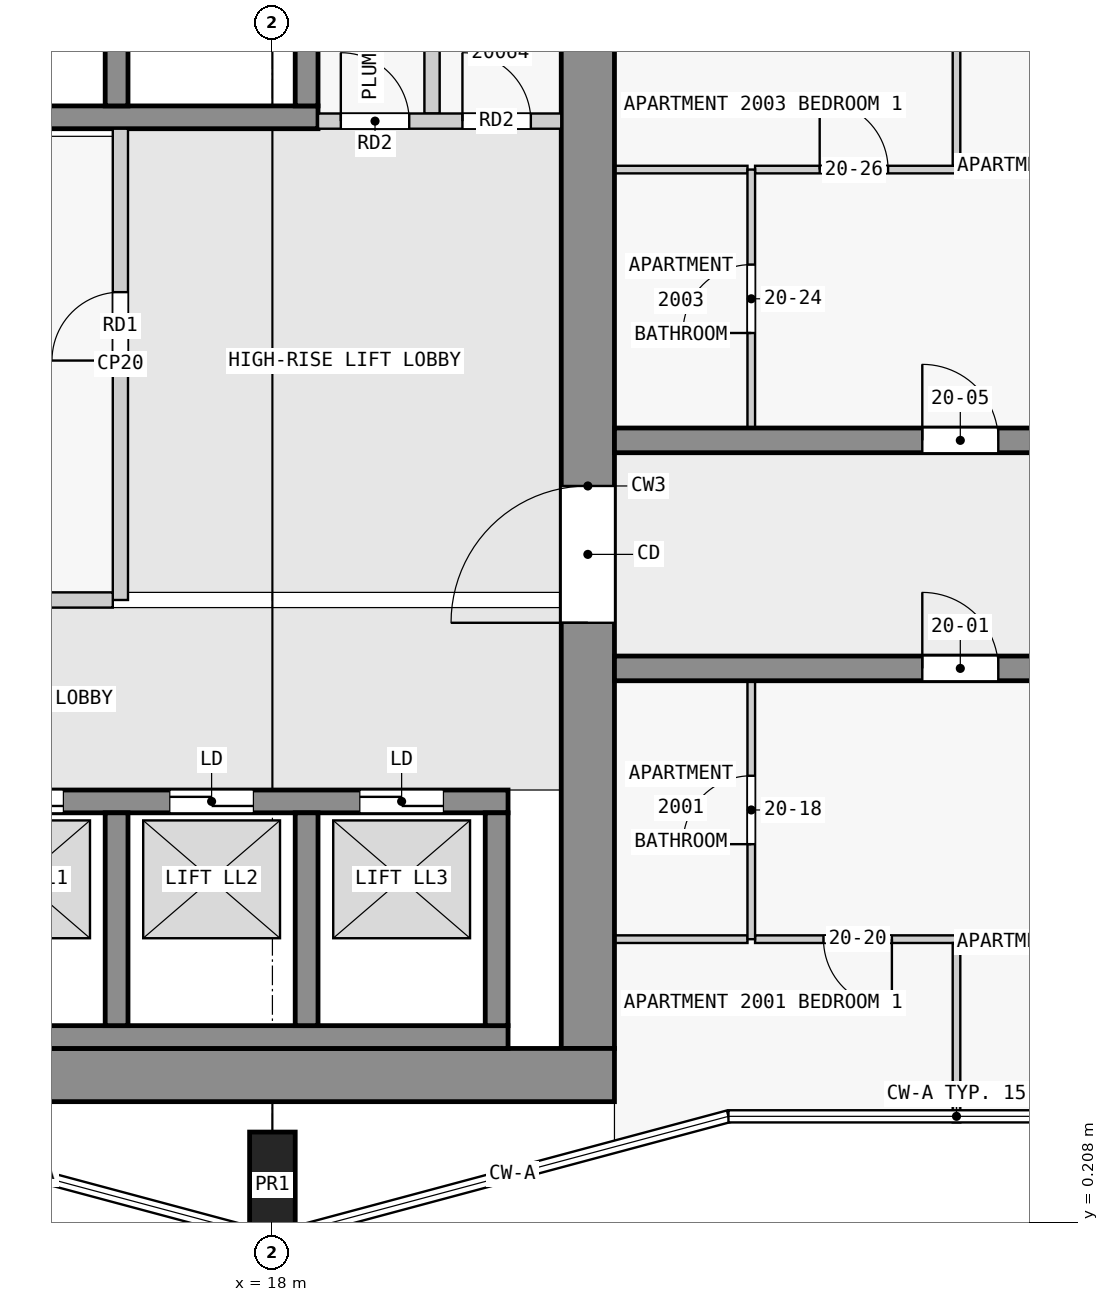
"""IFC4 building model, lengths in metres.
Left out: names, types, materials, properties, quantities, classifications, styles, units other than length and angle.
Written with IfcOpenShell. Run it as: python <this file> out.ifc"""

import sys

from ifc_helpers import new_model, si_unit, direction, frame, frame_2d, origin, origin_2d, place, context, subcontext, project, spatial, rectangle, extrude, element, fill, save


model = new_model("IFC4")
c1 = context("Model", 3, precision=1e-05, world=origin(), true_north=direction((0.0, 1.0)))
c2 = subcontext(c1, "Body", "Model", "MODEL_VIEW")
j1 = project(units=[si_unit("LENGTHUNIT", "METRE"), si_unit("PLANEANGLEUNIT", "RADIAN")], contexts=[c1])
p1 = place(None, origin())
s1 = spatial("IfcSite", under=j1, at=p1, CompositionType="ELEMENT")
p2 = place(p1, origin())
s2 = spatial("IfcBuilding", under=s1, at=p2, CompositionType="ELEMENT")
p3 = place(p2, frame((0.0, 0.0, 81.8)))
s3 = spatial("IfcBuildingStorey", under=s2, at=p3, CompositionType="ELEMENT", Elevation=81.8)
p4 = place(p3, frame((18.0, 0.7, 0.0), z_axis=(0.0, 0.0, 1.0), x_axis=(1.0, 0.0, 0.0)))
e1 = element("IfcColumn", 1, at=p4, inside=s3, PredefinedType="COLUMN", context=c2, shape_type="SweptSolid", body=[
    extrude(rectangle(XDim=0.6, YDim=1.4, at=origin_2d()), origin(), (0.0, 0.0, 1.0), 3.5),
])
p5 = place(p3, frame((1.6, 2.15, 0.0), z_axis=(0.0, 0.0, 1.0), x_axis=(1.0, 0.0, 0.0)))
e2 = element("IfcWall", 2, at=p5, inside=s3, PredefinedType="SHEAR", context=c2, shape_type="SweptSolid", body=[
    extrude(rectangle(XDim=20.9, YDim=0.7, at=frame_2d((10.45, 0.0))), origin(), (0.0, 0.0, 1.0), 3.25),
])
p6 = place(p3, frame((22.15, 2.5, 0.0), z_axis=(0.0, 0.0, 1.0), x_axis=(0.0, 1.0, 0.0)))
e3 = element("IfcWall", 3, at=p6, inside=s3, PredefinedType="SHEAR", context=c2, shape_type="SweptSolid", body=[
    extrude(rectangle(XDim=14.8, YDim=0.7, at=frame_2d((7.4, 0.0))), origin(), (0.0, 0.0, 1.0), 3.25),
])
p7 = place(p6, frame((5.6, 0.0, 0.0)))
e4 = element("IfcOpeningElement", 4, at=p7, cuts=e3, PredefinedType="OPENING", context=c2, shape_type="SweptSolid", body=[
    extrude(rectangle(XDim=1.8, YDim=2.1, at=frame_2d((0.9, 1.05))), frame((0.0, 0.36, 0.0), z_axis=(0.0, -1.0, 0.0), x_axis=(1.0, 0.0, 0.0)), (0.0, 0.0, 1.0), 0.72),
])
p8 = place(p3, frame((13.3, 2.65, 0.0), z_axis=(0.0, 0.0, 1.0), x_axis=(1.0, 0.0, 0.0)))
e5 = element("IfcWall", 5, at=p8, inside=s3, PredefinedType="SHEAR", context=c2, shape_type="SweptSolid", body=[
    extrude(rectangle(XDim=7.8, YDim=0.3, at=frame_2d((3.9, 0.0))), origin(), (0.0, 0.0, 1.0), 3.25),
])
for number, where, z_axis, x_axis in (
    (6, (15.95, 2.8, 0.0), (0.0, 0.0, 1.0), (0.0, 1.0, 0.0)),
    (7, (18.45, 2.8, 0.0), (0.0, 0.0, 1.0), (0.0, 1.0, 0.0)),
    (8, (20.95, 2.8, 0.0), (0.0, 0.0, 1.0), (0.0, 1.0, 0.0)),
):
    element("IfcWall", number, at=place(p3, frame(where, z_axis=z_axis, x_axis=x_axis)), inside=s3, PredefinedType="SHEAR", context=c2, shape_type="SweptSolid", body=[
        extrude(rectangle(XDim=2.8, YDim=0.3, at=frame_2d((1.4, 0.0))), origin(), (0.0, 0.0, 1.0), 3.25),
    ])
p9 = place(p3, frame((2.3, 5.75, 0.0), z_axis=(0.0, 0.0, 1.0), x_axis=(1.0, 0.0, 0.0)))
e9 = element("IfcWall", 9, at=p9, inside=s3, PredefinedType="SHEAR", context=c2, shape_type="SweptSolid", body=[
    extrude(rectangle(XDim=18.8, YDim=0.3, at=frame_2d((9.4, 0.0))), origin(), (0.0, 0.0, 1.0), 3.25),
])
p10 = place(p9, frame((4.65, 0.0, 0.0)))
e10 = element("IfcOpeningElement", 10, at=p10, cuts=e9, PredefinedType="OPENING", context=c2, shape_type="SweptSolid", body=[
    extrude(rectangle(XDim=1.1, YDim=2.1, at=frame_2d((0.55, 1.05))), frame((0.0, 0.16, 0.0), z_axis=(0.0, -1.0, 0.0), x_axis=(1.0, 0.0, 0.0)), (0.0, 0.0, 1.0), 0.32),
])
p11 = place(p9, frame((0.45, 0.0, 0.0)))
e11 = element("IfcOpeningElement", 11, at=p11, cuts=e9, PredefinedType="OPENING", context=c2, shape_type="SweptSolid", body=[
    extrude(rectangle(XDim=1.1, YDim=2.1, at=frame_2d((0.55, 1.05))), frame((0.0, 0.16, 0.0), z_axis=(0.0, -1.0, 0.0), x_axis=(1.0, 0.0, 0.0)), (0.0, 0.0, 1.0), 0.32),
])
p12 = place(p9, frame((2.75, 0.0, 0.0)))
e12 = element("IfcOpeningElement", 12, at=p12, cuts=e9, PredefinedType="OPENING", context=c2, shape_type="SweptSolid", body=[
    extrude(rectangle(XDim=1.1, YDim=2.1, at=frame_2d((0.55, 1.05))), frame((0.0, 0.16, 0.0), z_axis=(0.0, -1.0, 0.0), x_axis=(1.0, 0.0, 0.0)), (0.0, 0.0, 1.0), 0.32),
])
p13 = place(p9, frame((11.85, 0.0, 0.0)))
e13 = element("IfcOpeningElement", 13, at=p13, cuts=e9, PredefinedType="OPENING", context=c2, shape_type="SweptSolid", body=[
    extrude(rectangle(XDim=1.1, YDim=2.1, at=frame_2d((0.55, 1.05))), frame((0.0, 0.16, 0.0), z_axis=(0.0, -1.0, 0.0), x_axis=(1.0, 0.0, 0.0)), (0.0, 0.0, 1.0), 0.32),
])
p14 = place(p9, frame((14.35, 0.0, 0.0)))
e14 = element("IfcOpeningElement", 14, at=p14, cuts=e9, PredefinedType="OPENING", context=c2, shape_type="SweptSolid", body=[
    extrude(rectangle(XDim=1.1, YDim=2.1, at=frame_2d((0.55, 1.05))), frame((0.0, 0.16, 0.0), z_axis=(0.0, -1.0, 0.0), x_axis=(1.0, 0.0, 0.0)), (0.0, 0.0, 1.0), 0.32),
])
p15 = place(p9, frame((16.85, 0.0, 0.0)))
e15 = element("IfcOpeningElement", 15, at=p15, cuts=e9, PredefinedType="OPENING", context=c2, shape_type="SweptSolid", body=[
    extrude(rectangle(XDim=1.1, YDim=2.1, at=frame_2d((0.55, 1.05))), frame((0.0, 0.16, 0.0), z_axis=(0.0, -1.0, 0.0), x_axis=(1.0, 0.0, 0.0)), (0.0, 0.0, 1.0), 0.32),
])
p16 = place(p3, frame((10.8, 14.75, 0.0), z_axis=(0.0, 0.0, 1.0), x_axis=(1.0, 0.0, 0.0)))
e16 = element("IfcWall", 16, at=p16, inside=s3, PredefinedType="SHEAR", context=c2, shape_type="SweptSolid", body=[
    extrude(rectangle(XDim=7.8, YDim=0.3, at=frame_2d((3.9, 0.0))), origin(), (0.0, 0.0, 1.0), 3.25),
])
for number, where, z_axis, x_axis in (
    (17, (15.95, 14.9, 0.0), (0.0, 0.0, 1.0), (0.0, 1.0, 0.0)),
    (18, (18.45, 14.9, 0.0), (0.0, 0.0, 1.0), (0.0, 1.0, 0.0)),
):
    element("IfcWall", number, at=place(p3, frame(where, z_axis=z_axis, x_axis=x_axis)), inside=s3, PredefinedType="SHEAR", context=c2, shape_type="SweptSolid", body=[
        extrude(rectangle(XDim=2.0, YDim=0.3, at=frame_2d((1.0, 0.0))), origin(), (0.0, 0.0, 1.0), 3.25),
    ])
p17 = place(p3, frame((22.5, 7.5, 0.0), z_axis=(0.0, 0.0, 1.0), x_axis=(1.0, 0.0, 0.0)))
e19 = element("IfcWall", 19, at=p17, inside=s3, PredefinedType="SHEAR", context=c2, shape_type="SweptSolid", body=[
    extrude(rectangle(XDim=22.5, YDim=0.325, at=frame_2d((11.25, 0.0))), origin(), (0.0, 0.0, 1.0), 3.25),
])
p18 = place(p17, frame((4.05, 0.0, 0.0)))
e20 = element("IfcOpeningElement", 20, at=p18, cuts=e19, PredefinedType="OPENING", context=c2, shape_type="SweptSolid", body=[
    extrude(rectangle(XDim=1.0, YDim=2.1, at=frame_2d((0.5, 1.05))), frame((0.0, 0.172, 0.0), z_axis=(0.0, -1.0, 0.0), x_axis=(1.0, 0.0, 0.0)), (0.0, 0.0, 1.0), 0.345),
])
p19 = place(p17, frame((13.05, 0.0, 0.0)))
e21 = element("IfcOpeningElement", 21, at=p19, cuts=e19, PredefinedType="OPENING", context=c2, shape_type="SweptSolid", body=[
    extrude(rectangle(XDim=1.0, YDim=2.1, at=frame_2d((0.5, 1.05))), frame((0.0, 0.172, 0.0), z_axis=(0.0, -1.0, 0.0), x_axis=(1.0, 0.0, 0.0)), (0.0, 0.0, 1.0), 0.345),
])
p20 = place(p17, frame((18.75, 0.0, 0.0)))
e22 = element("IfcOpeningElement", 22, at=p20, cuts=e19, PredefinedType="OPENING", context=c2, shape_type="SweptSolid", body=[
    extrude(rectangle(XDim=0.9, YDim=2.1, at=frame_2d((0.45, 1.05))), frame((0.0, 0.172, 0.0), z_axis=(0.0, -1.0, 0.0), x_axis=(1.0, 0.0, 0.0)), (0.0, 0.0, 1.0), 0.345),
])
p21 = place(p17, frame((20.95, 0.0, 0.0)))
e23 = element("IfcOpeningElement", 23, at=p21, cuts=e19, PredefinedType="OPENING", context=c2, shape_type="SweptSolid", body=[
    extrude(rectangle(XDim=1.0, YDim=2.1, at=frame_2d((0.5, 1.05))), frame((0.0, 0.172, 0.0), z_axis=(0.0, -1.0, 0.0), x_axis=(1.0, 0.0, 0.0)), (0.0, 0.0, 1.0), 0.345),
])
p22 = place(p3, frame((22.5, 10.5, 0.0), z_axis=(0.0, 0.0, 1.0), x_axis=(1.0, 0.0, 0.0)))
e24 = element("IfcWall", 24, at=p22, inside=s3, PredefinedType="SHEAR", context=c2, shape_type="SweptSolid", body=[
    extrude(rectangle(XDim=22.5, YDim=0.325, at=frame_2d((11.25, 0.0))), origin(), (0.0, 0.0, 1.0), 3.25),
])
p23 = place(p22, frame((4.05, 0.0, 0.0)))
e25 = element("IfcOpeningElement", 25, at=p23, cuts=e24, PredefinedType="OPENING", context=c2, shape_type="SweptSolid", body=[
    extrude(rectangle(XDim=1.0, YDim=2.1, at=frame_2d((0.5, 1.05))), frame((0.0, 0.172, 0.0), z_axis=(0.0, -1.0, 0.0), x_axis=(1.0, 0.0, 0.0)), (0.0, 0.0, 1.0), 0.345),
])
p24 = place(p22, frame((10.75, 0.0, 0.0)))
e26 = element("IfcOpeningElement", 26, at=p24, cuts=e24, PredefinedType="OPENING", context=c2, shape_type="SweptSolid", body=[
    extrude(rectangle(XDim=1.0, YDim=2.1, at=frame_2d((0.5, 1.05))), frame((0.0, 0.172, 0.0), z_axis=(0.0, -1.0, 0.0), x_axis=(1.0, 0.0, 0.0)), (0.0, 0.0, 1.0), 0.345),
])
p25 = place(p22, frame((16.85, 0.0, 0.0)))
e27 = element("IfcOpeningElement", 27, at=p25, cuts=e24, PredefinedType="OPENING", context=c2, shape_type="SweptSolid", body=[
    extrude(rectangle(XDim=1.0, YDim=2.1, at=frame_2d((0.5, 1.05))), frame((0.0, 0.172, 0.0), z_axis=(0.0, -1.0, 0.0), x_axis=(1.0, 0.0, 0.0)), (0.0, 0.0, 1.0), 0.345),
])
p26 = place(p3, frame((10.9, 8.4, 0.0), z_axis=(0.0, 0.0, 1.0), x_axis=(1.0, 0.0, 0.0)))
e28 = element("IfcWall", 28, at=p26, inside=s3, PredefinedType="PARTITIONING", context=c2, shape_type="SweptSolid", body=[
    extrude(rectangle(XDim=5.0, YDim=0.2, at=frame_2d((2.5, 0.0))), origin(), (0.0, 0.0, 1.0), 3.25),
])
p27 = place(p3, frame((16.0, 8.4, 0.0), z_axis=(0.0, 0.0, 1.0), x_axis=(0.0, 1.0, 0.0)))
e29 = element("IfcWall", 29, at=p27, inside=s3, PredefinedType="PARTITIONING", context=c2, shape_type="SweptSolid", body=[
    extrude(rectangle(XDim=6.2, YDim=0.2, at=frame_2d((3.1, 0.0))), origin(), (0.0, 0.0, 1.0), 3.25),
])
p28 = place(p27, frame((3.15, 0.0, 0.0)))
e30 = element("IfcOpeningElement", 30, at=p28, cuts=e29, PredefinedType="OPENING", context=c2, shape_type="SweptSolid", body=[
    extrude(rectangle(XDim=0.9, YDim=2.1, at=frame_2d((0.45, 1.05))), frame((0.0, 0.11, 0.0), z_axis=(0.0, -1.0, 0.0), x_axis=(1.0, 0.0, 0.0)), (0.0, 0.0, 1.0), 0.22),
])
p29 = place(p3, frame((18.6, 14.7, 0.0), z_axis=(0.0, 0.0, 1.0), x_axis=(1.0, 0.0, 0.0)))
e31 = element("IfcWall", 31, at=p29, inside=s3, PredefinedType="PARTITIONING", context=c2, shape_type="SweptSolid", body=[
    extrude(rectangle(XDim=3.2, YDim=0.2, at=frame_2d((1.6, 0.0))), origin(), (0.0, 0.0, 1.0), 3.25),
])
p30 = place(p29, frame((0.3, 0.0, 0.0)))
e32 = element("IfcOpeningElement", 32, at=p30, cuts=e31, PredefinedType="OPENING", context=c2, shape_type="SweptSolid", body=[
    extrude(rectangle(XDim=0.9, YDim=2.1, at=frame_2d((0.45, 1.05))), frame((0.0, 0.11, 0.0), z_axis=(0.0, -1.0, 0.0), x_axis=(1.0, 0.0, 0.0)), (0.0, 0.0, 1.0), 0.22),
])
p31 = place(p29, frame((1.9, 0.0, 0.0)))
e33 = element("IfcOpeningElement", 33, at=p31, cuts=e31, PredefinedType="OPENING", context=c2, shape_type="SweptSolid", body=[
    extrude(rectangle(XDim=0.9, YDim=2.1, at=frame_2d((0.45, 1.05))), frame((0.0, 0.11, 0.0), z_axis=(0.0, -1.0, 0.0), x_axis=(1.0, 0.0, 0.0)), (0.0, 0.0, 1.0), 0.22),
])
p32 = place(p3, frame((20.1, 14.8, 0.0), z_axis=(0.0, 0.0, 1.0), x_axis=(0.0, 1.0, 0.0)))
e34 = element("IfcWall", 34, at=p32, inside=s3, PredefinedType="PARTITIONING", context=c2, shape_type="SweptSolid", body=[
    extrude(rectangle(XDim=2.5, YDim=0.2, at=frame_2d((1.25, 0.0))), origin(), (0.0, 0.0, 1.0), 3.25),
])
p33 = place(p3, frame((27.0, 3.938, 0.0), z_axis=(0.0, 0.0, 1.0), x_axis=(-1.0, 0.0, 0.0)))
e35 = element("IfcWall", 35, at=p33, inside=s3, PredefinedType="PARTITIONING", context=c2, shape_type="SweptSolid", body=[
    extrude(rectangle(XDim=2.65, YDim=0.1, at=frame_2d((1.325, 0.0))), origin(), (0.0, 0.0, 1.0), 3.25),
])
p34 = place(p33, frame((0.85, 0.0, 0.0)))
e36 = element("IfcOpeningElement", 36, at=p34, cuts=e35, PredefinedType="OPENING", context=c2, shape_type="SweptSolid", body=[
    extrude(rectangle(XDim=0.9, YDim=2.1, at=frame_2d((0.45, 1.05))), frame((0.0, 0.06, 0.0), z_axis=(0.0, -1.0, 0.0), x_axis=(1.0, 0.0, 0.0)), (0.0, 0.0, 1.0), 0.12),
])
for number, where, z_axis, x_axis in (
    (37, (22.5, 3.938, 0.0), (0.0, 0.0, 1.0), (1.0, 0.0, 0.0)),
    (38, (24.25, 14.062, 0.0), (0.0, 0.0, 1.0), (-1.0, 0.0, 0.0)),
):
    element("IfcWall", number, at=place(p3, frame(where, z_axis=z_axis, x_axis=x_axis)), inside=s3, PredefinedType="PARTITIONING", context=c2, shape_type="SweptSolid", body=[
        extrude(rectangle(XDim=1.75, YDim=0.1, at=frame_2d((0.875, 0.0))), origin(), (0.0, 0.0, 1.0), 3.25),
    ])
p35 = place(p3, frame((24.35, 14.062, 0.0), z_axis=(0.0, 0.0, 1.0), x_axis=(1.0, 0.0, 0.0)))
e39 = element("IfcWall", 39, at=p35, inside=s3, PredefinedType="PARTITIONING", context=c2, shape_type="SweptSolid", body=[
    extrude(rectangle(XDim=2.65, YDim=0.1, at=frame_2d((1.325, 0.0))), origin(), (0.0, 0.0, 1.0), 3.25),
])
p36 = place(p35, frame((0.85, 0.0, 0.0)))
e40 = element("IfcOpeningElement", 40, at=p36, cuts=e39, PredefinedType="OPENING", context=c2, shape_type="SweptSolid", body=[
    extrude(rectangle(XDim=0.9, YDim=2.1, at=frame_2d((0.45, 1.05))), frame((0.0, 0.06, 0.0), z_axis=(0.0, -1.0, 0.0), x_axis=(1.0, 0.0, 0.0)), (0.0, 0.0, 1.0), 0.12),
])
p37 = place(p3, frame((24.3, 3.938, 0.0), z_axis=(0.0, 0.0, 1.0), x_axis=(0.0, 1.0, 0.0)))
e41 = element("IfcWall", 41, at=p37, inside=s3, PredefinedType="PARTITIONING", context=c2, shape_type="SweptSolid", body=[
    extrude(rectangle(XDim=3.4, YDim=0.1, at=frame_2d((1.7, 0.0))), origin(), (0.0, 0.0, 1.0), 3.25),
])
p38 = place(p37, frame((1.25, 0.0, 0.0)))
e42 = element("IfcOpeningElement", 42, at=p38, cuts=e41, PredefinedType="OPENING", context=c2, shape_type="SweptSolid", body=[
    extrude(rectangle(XDim=0.9, YDim=2.1, at=frame_2d((0.45, 1.05))), frame((0.0, 0.06, 0.0), z_axis=(0.0, -1.0, 0.0), x_axis=(1.0, 0.0, 0.0)), (0.0, 0.0, 1.0), 0.12),
])
p39 = place(p3, frame((24.3, 10.663, 0.0), z_axis=(0.0, 0.0, 1.0), x_axis=(0.0, 1.0, 0.0)))
e43 = element("IfcWall", 43, at=p39, inside=s3, PredefinedType="PARTITIONING", context=c2, shape_type="SweptSolid", body=[
    extrude(rectangle(XDim=3.4, YDim=0.1, at=frame_2d((1.7, 0.0))), origin(), (0.0, 0.0, 1.0), 3.25),
])
p40 = place(p39, frame((1.25, 0.0, 0.0)))
e44 = element("IfcOpeningElement", 44, at=p40, cuts=e43, PredefinedType="OPENING", context=c2, shape_type="SweptSolid", body=[
    extrude(rectangle(XDim=0.9, YDim=2.1, at=frame_2d((0.45, 1.05))), frame((0.0, 0.06, 0.0), z_axis=(0.0, -1.0, 0.0), x_axis=(1.0, 0.0, 0.0)), (0.0, 0.0, 1.0), 0.12),
])
for number, where, z_axis, x_axis in (
    (45, (27.0, 1.527, 0.0), (0.0, 0.0, 1.0), (0.0, 1.0, 0.0)),
    (46, (27.0, 14.113, 0.0), (0.0, 0.0, 1.0), (0.0, 1.0, 0.0)),
):
    element("IfcWall", number, at=place(p3, frame(where, z_axis=z_axis, x_axis=x_axis)), inside=s3, PredefinedType="PARTITIONING", context=c2, shape_type="SweptSolid", body=[
        extrude(rectangle(XDim=2.361, YDim=0.1, at=frame_2d((1.18, 0.0))), origin(), (0.0, 0.0, 1.0), 3.25),
    ])
p41 = place(p28, origin())
e47 = element("IfcDoor", 47, at=p41, inside=s3, OperationType="SINGLE_SWING_LEFT", PredefinedType="DOOR", context=c2, shape_type="SweptSolid", body=[
    extrude(rectangle(XDim=0.9, YDim=2.1, at=frame_2d((0.45, 1.05))), frame((0.0, 0.025, 0.0), z_axis=(0.0, -1.0, 0.0), x_axis=(1.0, 0.0, 0.0)), (0.0, 0.0, 1.0), 0.05),
])
fill(e30, e47)
p42 = place(p13, origin())
e48 = element("IfcDoor", 48, at=p42, inside=s3, OperationType="DOUBLE_DOOR_SLIDING", PredefinedType="DOOR", context=c2, shape_type="SweptSolid", body=[
    extrude(rectangle(XDim=1.1, YDim=2.1, at=frame_2d((0.55, 1.05))), frame((0.0, 0.025, 0.0), z_axis=(0.0, -1.0, 0.0), x_axis=(1.0, 0.0, 0.0)), (0.0, 0.0, 1.0), 0.05),
])
fill(e13, e48)
p43 = place(p14, origin())
e49 = element("IfcDoor", 49, at=p43, inside=s3, OperationType="DOUBLE_DOOR_SLIDING", PredefinedType="DOOR", context=c2, shape_type="SweptSolid", body=[
    extrude(rectangle(XDim=1.1, YDim=2.1, at=frame_2d((0.55, 1.05))), frame((0.0, 0.025, 0.0), z_axis=(0.0, -1.0, 0.0), x_axis=(1.0, 0.0, 0.0)), (0.0, 0.0, 1.0), 0.05),
])
fill(e14, e49)
p44 = place(p15, origin())
e50 = element("IfcDoor", 50, at=p44, inside=s3, OperationType="DOUBLE_DOOR_SLIDING", PredefinedType="DOOR", context=c2, shape_type="SweptSolid", body=[
    extrude(rectangle(XDim=1.1, YDim=2.1, at=frame_2d((0.55, 1.05))), frame((0.0, 0.025, 0.0), z_axis=(0.0, -1.0, 0.0), x_axis=(1.0, 0.0, 0.0)), (0.0, 0.0, 1.0), 0.05),
])
fill(e15, e50)
p45 = place(p7, origin())
e51 = element("IfcDoor", 51, at=p45, inside=s3, OperationType="DOUBLE_DOOR_SINGLE_SWING", PredefinedType="DOOR", context=c2, shape_type="SweptSolid", body=[
    extrude(rectangle(XDim=1.8, YDim=2.1, at=frame_2d((0.9, 1.05))), frame((0.0, 0.025, 0.0), z_axis=(0.0, -1.0, 0.0), x_axis=(1.0, 0.0, 0.0)), (0.0, 0.0, 1.0), 0.05),
])
fill(e4, e51)
p46 = place(p30, origin())
e52 = element("IfcDoor", 52, at=p46, inside=s3, OperationType="SINGLE_SWING_LEFT", PredefinedType="DOOR", context=c2, shape_type="SweptSolid", body=[
    extrude(rectangle(XDim=0.9, YDim=2.1, at=frame_2d((0.45, 1.05))), frame((0.0, 0.025, 0.0), z_axis=(0.0, -1.0, 0.0), x_axis=(1.0, 0.0, 0.0)), (0.0, 0.0, 1.0), 0.05),
])
fill(e32, e52)
p47 = place(p31, origin())
e53 = element("IfcDoor", 53, at=p47, inside=s3, OperationType="SINGLE_SWING_LEFT", PredefinedType="DOOR", context=c2, shape_type="SweptSolid", body=[
    extrude(rectangle(XDim=0.9, YDim=2.1, at=frame_2d((0.45, 1.05))), frame((0.0, 0.025, 0.0), z_axis=(0.0, -1.0, 0.0), x_axis=(1.0, 0.0, 0.0)), (0.0, 0.0, 1.0), 0.05),
])
fill(e33, e53)
p48 = place(p18, origin())
e54 = element("IfcDoor", 54, at=p48, inside=s3, OperationType="SINGLE_SWING_LEFT", PredefinedType="DOOR", context=c2, shape_type="SweptSolid", body=[
    extrude(rectangle(XDim=1.0, YDim=2.1, at=frame_2d((0.5, 1.05))), frame((0.0, 0.025, 0.0), z_axis=(0.0, -1.0, 0.0), x_axis=(1.0, 0.0, 0.0)), (0.0, 0.0, 1.0), 0.05),
])
fill(e20, e54)
p49 = place(p23, origin())
e55 = element("IfcDoor", 55, at=p49, inside=s3, OperationType="SINGLE_SWING_LEFT", PredefinedType="DOOR", context=c2, shape_type="SweptSolid", body=[
    extrude(rectangle(XDim=1.0, YDim=2.1, at=frame_2d((0.5, 1.05))), frame((0.0, 0.025, 0.0), z_axis=(0.0, -1.0, 0.0), x_axis=(1.0, 0.0, 0.0)), (0.0, 0.0, 1.0), 0.05),
])
fill(e25, e55)
p50 = place(p38, origin())
e56 = element("IfcDoor", 56, at=p50, inside=s3, OperationType="SINGLE_SWING_LEFT", PredefinedType="DOOR", context=c2, shape_type="SweptSolid", body=[
    extrude(rectangle(XDim=0.9, YDim=2.1, at=frame_2d((0.45, 1.05))), frame((0.0, 0.025, 0.0), z_axis=(0.0, -1.0, 0.0), x_axis=(1.0, 0.0, 0.0)), (0.0, 0.0, 1.0), 0.05),
])
fill(e42, e56)
p51 = place(p34, origin())
e57 = element("IfcDoor", 57, at=p51, inside=s3, OperationType="SINGLE_SWING_LEFT", PredefinedType="DOOR", context=c2, shape_type="SweptSolid", body=[
    extrude(rectangle(XDim=0.9, YDim=2.1, at=frame_2d((0.45, 1.05))), frame((0.0, 0.025, 0.0), z_axis=(0.0, -1.0, 0.0), x_axis=(1.0, 0.0, 0.0)), (0.0, 0.0, 1.0), 0.05),
])
fill(e36, e57)
p52 = place(p40, origin())
e58 = element("IfcDoor", 58, at=p52, inside=s3, OperationType="SINGLE_SWING_LEFT", PredefinedType="DOOR", context=c2, shape_type="SweptSolid", body=[
    extrude(rectangle(XDim=0.9, YDim=2.1, at=frame_2d((0.45, 1.05))), frame((0.0, 0.025, 0.0), z_axis=(0.0, -1.0, 0.0), x_axis=(1.0, 0.0, 0.0)), (0.0, 0.0, 1.0), 0.05),
])
fill(e44, e58)
p53 = place(p36, origin())
e59 = element("IfcDoor", 59, at=p53, inside=s3, OperationType="SINGLE_SWING_LEFT", PredefinedType="DOOR", context=c2, shape_type="SweptSolid", body=[
    extrude(rectangle(XDim=0.9, YDim=2.1, at=frame_2d((0.45, 1.05))), frame((0.0, 0.025, 0.0), z_axis=(0.0, -1.0, 0.0), x_axis=(1.0, 0.0, 0.0)), (0.0, 0.0, 1.0), 0.05),
])
fill(e40, e59)
save(model, sys.argv[1])
